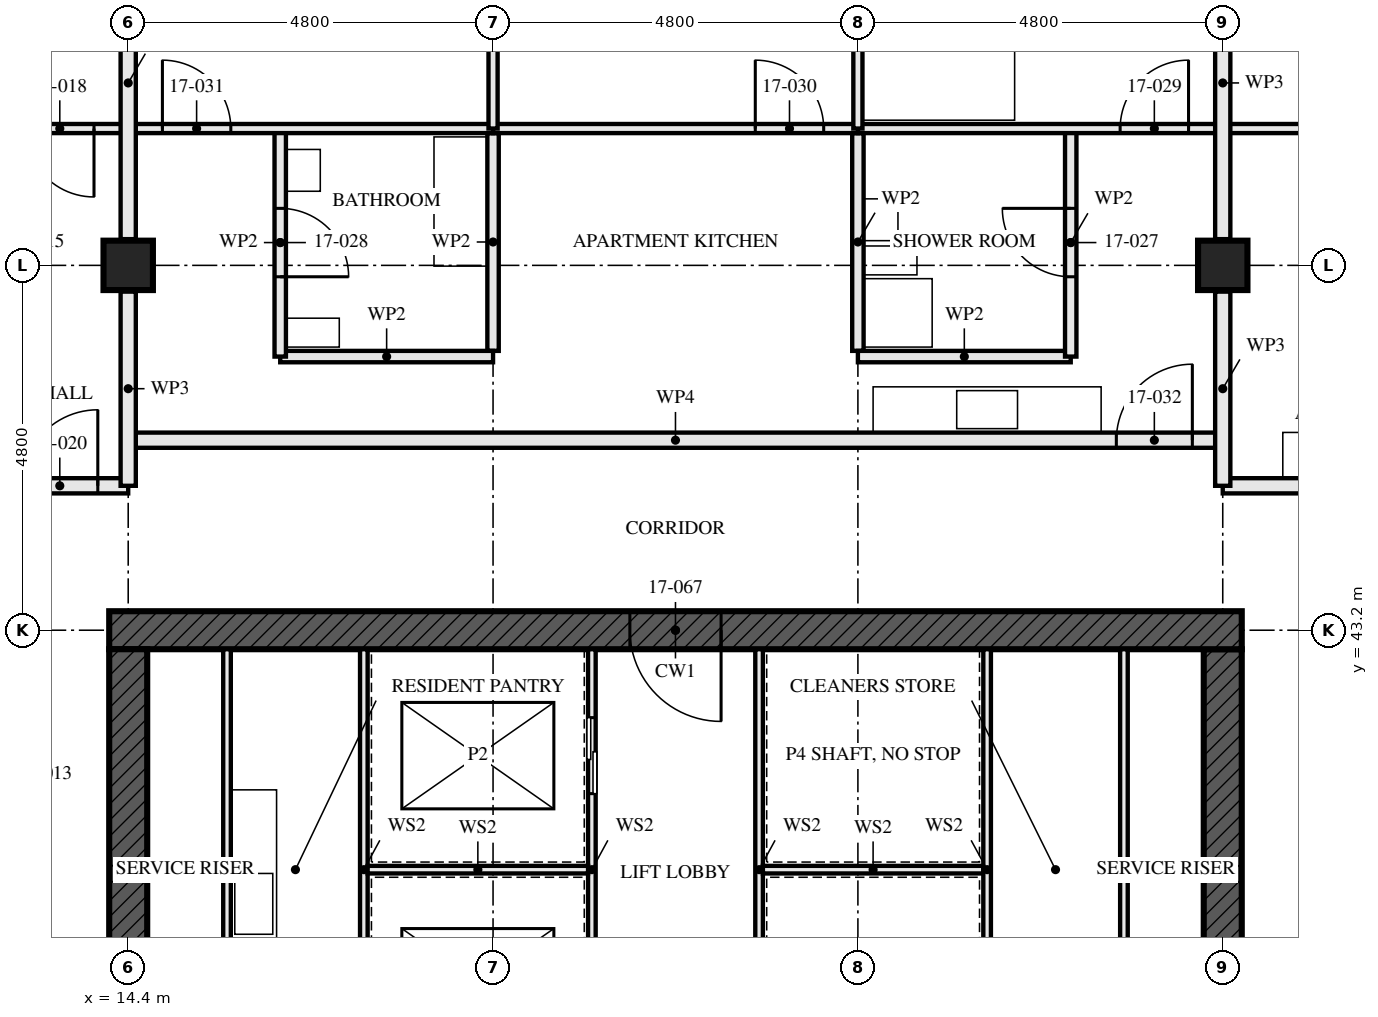
"""IFC4 building model, lengths in metres.
Left out: names, types, materials, properties, quantities, classifications, styles, units other than length and angle.
Written with IfcOpenShell. Run it as: python <this file> out.ifc"""

import sys

from ifc_helpers import new_model, si_unit, direction, frame, frame_2d, origin, origin_2d, place, context, subcontext, project, spatial, rectangle, hollow_rectangle, extrude, element, fill, save


model = new_model("IFC4")
c1 = context("Model", 3, precision=1e-05, world=origin(), true_north=direction((0.0, 1.0)))
c2 = subcontext(c1, "Body", "Model", "MODEL_VIEW")
j1 = project(units=[si_unit("LENGTHUNIT", "METRE"), si_unit("PLANEANGLEUNIT", "RADIAN")], contexts=[c1])
p1 = place(None, origin())
s1 = spatial("IfcSite", under=j1, at=p1, CompositionType="ELEMENT")
p2 = place(p1, origin())
s2 = spatial("IfcBuilding", under=s1, at=p2, CompositionType="ELEMENT")
p3 = place(p2, frame((0.0, 0.0, 65.5)))
s3 = spatial("IfcBuildingStorey", under=s2, at=p3, CompositionType="ELEMENT", Elevation=65.5)
for number, where, z_axis, x_axis in (
    (1, (14.4, 48.0, 0.0), (0.0, 0.0, 1.0), (1.0, 0.0, 0.0)),
    (2, (28.8, 48.0, 0.0), (0.0, 0.0, 1.0), (1.0, 0.0, 0.0)),
):
    element("IfcColumn", number, at=place(p3, frame(where, z_axis=z_axis, x_axis=x_axis)), inside=s3, PredefinedType="COLUMN", context=c2, shape_type="SweptSolid", body=[
        extrude(hollow_rectangle(XDim=0.65, YDim=0.65, WallThickness=0.05, at=origin_2d()), origin(), (0.0, 0.0, 1.0), 3.5),
    ])
p4 = place(p3, frame((29.05, 43.2, -0.17), z_axis=(0.0, 0.0, 1.0), x_axis=(-1.0, 0.0, 0.0)))
e3 = element("IfcWall", 3, at=p4, inside=s3, PredefinedType="SHEAR", context=c2, shape_type="SweptSolid", body=[
    extrude(rectangle(XDim=14.9, YDim=0.5, at=frame_2d((7.45, 0.0))), origin(), (0.0, 0.0, 1.0), 3.5),
])
p5 = place(p4, frame((6.85, 0.0, 0.17)))
e4 = element("IfcOpeningElement", 4, at=p5, cuts=e3, PredefinedType="OPENING", context=c2, shape_type="SweptSolid", body=[
    extrude(rectangle(XDim=1.2, YDim=2.1, at=frame_2d((0.6, 1.05))), frame((0.0, 0.26, 0.0), z_axis=(0.0, -1.0, 0.0), x_axis=(1.0, 0.0, 0.0)), (0.0, 0.0, 1.0), 0.521),
])
p6 = place(p3, frame((14.4, 42.95, -0.17), z_axis=(0.0, 0.0, 1.0), x_axis=(0.0, -1.0, 0.0)))
e5 = element("IfcWall", 5, at=p6, inside=s3, PredefinedType="SHEAR", context=c2, shape_type="SweptSolid", body=[
    extrude(rectangle(XDim=13.9, YDim=0.5, at=frame_2d((6.95, 0.0))), origin(), (0.0, 0.0, 1.0), 3.5),
])
p7 = place(p6, frame((6.35, 0.0, 0.17)))
e6 = element("IfcOpeningElement", 6, at=p7, cuts=e5, PredefinedType="OPENING", context=c2, shape_type="SweptSolid", body=[
    extrude(rectangle(XDim=1.2, YDim=2.1, at=frame_2d((0.6, 1.05))), frame((0.0, 0.26, 0.0), z_axis=(0.0, -1.0, 0.0), x_axis=(1.0, 0.0, 0.0)), (0.0, 0.0, 1.0), 0.521),
])
p8 = place(p3, frame((28.8, 29.05, -0.17), z_axis=(0.0, 0.0, 1.0), x_axis=(0.0, 1.0, 0.0)))
e7 = element("IfcWall", 7, at=p8, inside=s3, PredefinedType="SHEAR", context=c2, shape_type="SweptSolid", body=[
    extrude(rectangle(XDim=13.9, YDim=0.5, at=frame_2d((6.95, 0.0))), origin(), (0.0, 0.0, 1.0), 3.5),
])
p9 = place(p8, frame((6.35, 0.0, 0.17)))
e8 = element("IfcOpeningElement", 8, at=p9, cuts=e7, PredefinedType="OPENING", context=c2, shape_type="SweptSolid", body=[
    extrude(rectangle(XDim=1.2, YDim=2.1, at=frame_2d((0.6, 1.05))), frame((0.0, 0.26, 0.0), z_axis=(0.0, -1.0, 0.0), x_axis=(1.0, 0.0, 0.0)), (0.0, 0.0, 1.0), 0.521),
])
p10 = place(p3, frame((14.4, 49.8, 0.0), z_axis=(0.0, 0.0, 1.0), x_axis=(-1.0, 0.0, 0.0)))
e9 = element("IfcWall", 9, at=p10, inside=s3, PredefinedType="PARTITIONING", context=c2, shape_type="SweptSolid", body=[
    extrude(rectangle(XDim=4.8, YDim=0.12, at=frame_2d((2.4, 0.0))), origin(), (0.0, 0.0, 1.0), 3.33),
])
p11 = place(p10, frame((0.45, 0.0, 0.0)))
e10 = element("IfcOpeningElement", 10, at=p11, cuts=e9, PredefinedType="OPENING", context=c2, shape_type="SweptSolid", body=[
    extrude(rectangle(XDim=0.9, YDim=2.1, at=frame_2d((0.45, 1.05))), frame((0.0, 0.071, 0.0), z_axis=(0.0, -1.0, 0.0), x_axis=(1.0, 0.0, 0.0)), (0.0, 0.0, 1.0), 0.141),
])
p12 = place(p3, frame((14.4, 45.1, 0.0), z_axis=(0.0, 0.0, 1.0), x_axis=(-1.0, 0.0, 0.0)))
e11 = element("IfcWall", 11, at=p12, inside=s3, PredefinedType="PARTITIONING", context=c2, shape_type="SweptSolid", body=[
    extrude(rectangle(XDim=9.6, YDim=0.2, at=frame_2d((4.8, 0.0))), origin(), (0.0, 0.0, 1.0), 3.33),
])
p13 = place(p12, frame((0.4, 0.0, 0.0)))
e12 = element("IfcOpeningElement", 12, at=p13, cuts=e11, PredefinedType="OPENING", context=c2, shape_type="SweptSolid", body=[
    extrude(rectangle(XDim=1.0, YDim=2.1, at=frame_2d((0.5, 1.05))), frame((0.0, 0.111, 0.0), z_axis=(0.0, -1.0, 0.0), x_axis=(1.0, 0.0, 0.0)), (0.0, 0.0, 1.0), 0.221),
])
p14 = place(p3, frame((26.8, 49.8, 0.0), z_axis=(0.0, 0.0, 1.0), x_axis=(0.0, -1.0, 0.0)))
e13 = element("IfcWall", 13, at=p14, inside=s3, PredefinedType="PARTITIONING", context=c2, shape_type="SweptSolid", body=[
    extrude(rectangle(XDim=3.0, YDim=0.15, at=frame_2d((1.5, 0.0))), origin(), (0.0, 0.0, 1.0), 2.55),
])
p15 = place(p14, frame((1.05, 0.0, 0.0)))
e14 = element("IfcOpeningElement", 14, at=p15, cuts=e13, PredefinedType="OPENING", context=c2, shape_type="SweptSolid", body=[
    extrude(rectangle(XDim=0.9, YDim=2.1, at=frame_2d((0.45, 1.05))), frame((0.0, 0.085, 0.0), z_axis=(0.0, -1.0, 0.0), x_axis=(1.0, 0.0, 0.0)), (0.0, 0.0, 1.0), 0.171),
])
p16 = place(p3, frame((26.8, 46.8, 0.0), z_axis=(0.0, 0.0, 1.0), x_axis=(-1.0, 0.0, 0.0)))
e15 = element("IfcWall", 15, at=p16, inside=s3, PredefinedType="PARTITIONING", context=c2, shape_type="SweptSolid", body=[
    extrude(rectangle(XDim=2.8, YDim=0.15, at=frame_2d((1.4, 0.0))), origin(), (0.0, 0.0, 1.0), 3.33),
])
p17 = place(p3, frame((16.4, 49.8, 0.0), z_axis=(0.0, 0.0, 1.0), x_axis=(0.0, -1.0, 0.0)))
e16 = element("IfcWall", 16, at=p17, inside=s3, PredefinedType="PARTITIONING", context=c2, shape_type="SweptSolid", body=[
    extrude(rectangle(XDim=3.0, YDim=0.15, at=frame_2d((1.5, 0.0))), origin(), (0.0, 0.0, 1.0), 2.55),
])
p18 = place(p17, frame((1.05, 0.0, 0.0)))
e17 = element("IfcOpeningElement", 17, at=p18, cuts=e16, PredefinedType="OPENING", context=c2, shape_type="SweptSolid", body=[
    extrude(rectangle(XDim=0.9, YDim=2.1, at=frame_2d((0.45, 1.05))), frame((0.0, 0.085, 0.0), z_axis=(0.0, -1.0, 0.0), x_axis=(1.0, 0.0, 0.0)), (0.0, 0.0, 1.0), 0.171),
])
p19 = place(p3, frame((19.2, 46.8, 0.0), z_axis=(0.0, 0.0, 1.0), x_axis=(-1.0, 0.0, 0.0)))
e18 = element("IfcWall", 18, at=p19, inside=s3, PredefinedType="PARTITIONING", context=c2, shape_type="SweptSolid", body=[
    extrude(rectangle(XDim=2.8, YDim=0.15, at=frame_2d((1.4, 0.0))), origin(), (0.0, 0.0, 1.0), 3.33),
])
p20 = place(p3, frame((28.8, 49.8, 0.0), z_axis=(0.0, 0.0, 1.0), x_axis=(-1.0, 0.0, 0.0)))
e19 = element("IfcWall", 19, at=p20, inside=s3, PredefinedType="PARTITIONING", context=c2, shape_type="SweptSolid", body=[
    extrude(rectangle(XDim=4.8, YDim=0.12, at=frame_2d((2.4, 0.0))), origin(), (0.0, 0.0, 1.0), 3.33),
])
p21 = place(p20, frame((0.45, 0.0, 0.0)))
e20 = element("IfcOpeningElement", 20, at=p21, cuts=e19, PredefinedType="OPENING", context=c2, shape_type="SweptSolid", body=[
    extrude(rectangle(XDim=0.9, YDim=2.1, at=frame_2d((0.45, 1.05))), frame((0.0, 0.071, 0.0), z_axis=(0.0, -1.0, 0.0), x_axis=(1.0, 0.0, 0.0)), (0.0, 0.0, 1.0), 0.141),
])
p22 = place(p3, frame((24.0, 49.8, 0.0), z_axis=(0.0, 0.0, 1.0), x_axis=(-1.0, 0.0, 0.0)))
e21 = element("IfcWall", 21, at=p22, inside=s3, PredefinedType="PARTITIONING", context=c2, shape_type="SweptSolid", body=[
    extrude(rectangle(XDim=4.8, YDim=0.12, at=frame_2d((2.4, 0.0))), origin(), (0.0, 0.0, 1.0), 3.33),
])
p23 = place(p22, frame((0.45, 0.0, 0.0)))
e22 = element("IfcOpeningElement", 22, at=p23, cuts=e21, PredefinedType="OPENING", context=c2, shape_type="SweptSolid", body=[
    extrude(rectangle(XDim=0.9, YDim=2.1, at=frame_2d((0.45, 1.05))), frame((0.0, 0.071, 0.0), z_axis=(0.0, -1.0, 0.0), x_axis=(1.0, 0.0, 0.0)), (0.0, 0.0, 1.0), 0.141),
])
p24 = place(p3, frame((19.2, 49.8, 0.0), z_axis=(0.0, 0.0, 1.0), x_axis=(-1.0, 0.0, 0.0)))
e23 = element("IfcWall", 23, at=p24, inside=s3, PredefinedType="PARTITIONING", context=c2, shape_type="SweptSolid", body=[
    extrude(rectangle(XDim=4.8, YDim=0.12, at=frame_2d((2.4, 0.0))), origin(), (0.0, 0.0, 1.0), 3.33),
])
p25 = place(p24, frame((3.45, 0.0, 0.0)))
e24 = element("IfcOpeningElement", 24, at=p25, cuts=e23, PredefinedType="OPENING", context=c2, shape_type="SweptSolid", body=[
    extrude(rectangle(XDim=0.9, YDim=2.1, at=frame_2d((0.45, 1.05))), frame((0.0, 0.071, 0.0), z_axis=(0.0, -1.0, 0.0), x_axis=(1.0, 0.0, 0.0)), (0.0, 0.0, 1.0), 0.141),
])
for number, where, z_axis, x_axis in (
    (25, (24.0, 57.28, 0.0), (0.0, 0.0, 1.0), (0.0, -1.0, 0.0)),
    (26, (19.2, 57.28, 0.0), (0.0, 0.0, 1.0), (0.0, -1.0, 0.0)),
):
    element("IfcWall", number, at=place(p3, frame(where, z_axis=z_axis, x_axis=x_axis)), inside=s3, PredefinedType="PARTITIONING", context=c2, shape_type="SweptSolid", body=[
        extrude(rectangle(XDim=7.48, YDim=0.12, at=frame_2d((3.74, 0.0))), origin(), (0.0, 0.0, 1.0), 2.55),
    ])
p26 = place(p3, frame((28.8, 45.7, 0.0), z_axis=(0.0, 0.0, 1.0), x_axis=(-1.0, 0.0, 0.0)))
e27 = element("IfcWall", 27, at=p26, inside=s3, PredefinedType="PARTITIONING", context=c2, shape_type="SweptSolid", body=[
    extrude(rectangle(XDim=14.4, YDim=0.2, at=frame_2d((7.2, 0.0))), origin(), (0.0, 0.0, 1.0), 3.33),
])
p27 = place(p26, frame((0.4, 0.0, 0.0)))
e28 = element("IfcOpeningElement", 28, at=p27, cuts=e27, PredefinedType="OPENING", context=c2, shape_type="SweptSolid", body=[
    extrude(rectangle(XDim=1.0, YDim=2.1, at=frame_2d((0.5, 1.05))), frame((0.0, 0.111, 0.0), z_axis=(0.0, -1.0, 0.0), x_axis=(1.0, 0.0, 0.0)), (0.0, 0.0, 1.0), 0.221),
])
p28 = place(p3, frame((33.6, 49.8, 0.0), z_axis=(0.0, 0.0, 1.0), x_axis=(-1.0, 0.0, 0.0)))
e29 = element("IfcWall", 29, at=p28, inside=s3, PredefinedType="PARTITIONING", context=c2, shape_type="SweptSolid", body=[
    extrude(rectangle(XDim=4.8, YDim=0.12, at=frame_2d((2.4, 0.0))), origin(), (0.0, 0.0, 1.0), 3.33),
])
p29 = place(p3, frame((38.4, 45.1, 0.0), z_axis=(0.0, 0.0, 1.0), x_axis=(-1.0, 0.0, 0.0)))
e30 = element("IfcWall", 30, at=p29, inside=s3, PredefinedType="PARTITIONING", context=c2, shape_type="SweptSolid", body=[
    extrude(rectangle(XDim=9.6, YDim=0.2, at=frame_2d((4.8, 0.0))), origin(), (0.0, 0.0, 1.0), 3.33),
])
p30 = place(p29, frame((0.4, 0.0, 0.0)))
e31 = element("IfcOpeningElement", 31, at=p30, cuts=e30, PredefinedType="OPENING", context=c2, shape_type="SweptSolid", body=[
    extrude(rectangle(XDim=1.0, YDim=2.1, at=frame_2d((0.5, 1.05))), frame((0.0, 0.111, 0.0), z_axis=(0.0, -1.0, 0.0), x_axis=(1.0, 0.0, 0.0)), (0.0, 0.0, 1.0), 0.221),
])
for number, where, z_axis, x_axis in (
    (32, (15.7, 37.15, 0.0), (0.0, 0.0, 1.0), (0.0, 1.0, 0.0)),
    (33, (27.5, 37.15, 0.0), (0.0, 0.0, 1.0), (0.0, 1.0, 0.0)),
):
    element("IfcWall", number, at=place(p3, frame(where, z_axis=z_axis, x_axis=x_axis)), inside=s3, PredefinedType="SOLIDWALL", context=c2, shape_type="SweptSolid", body=[
        extrude(rectangle(XDim=5.8, YDim=0.1, at=frame_2d((2.9, 0.0))), origin(), (0.0, 0.0, 1.0), 3.33),
    ])
p31 = place(p3, frame((20.5, 37.15, 0.0), z_axis=(0.0, 0.0, 1.0), x_axis=(0.0, 1.0, 0.0)))
e34 = element("IfcWall", 34, at=p31, inside=s3, PredefinedType="SOLIDWALL", context=c2, shape_type="SweptSolid", body=[
    extrude(rectangle(XDim=5.8, YDim=0.1, at=frame_2d((2.9, 0.0))), origin(), (0.0, 0.0, 1.0), 3.33),
])
p32 = place(p31, frame((0.925, 0.0, 0.0)))
e35 = element("IfcOpeningElement", 35, at=p32, cuts=e34, PredefinedType="OPENING", context=c2, shape_type="SweptSolid", body=[
    extrude(rectangle(XDim=1.0, YDim=2.1, at=frame_2d((0.5, 1.05))), frame((0.0, 0.061, 0.0), z_axis=(0.0, -1.0, 0.0), x_axis=(1.0, 0.0, 0.0)), (0.0, 0.0, 1.0), 0.121),
])
p33 = place(p31, frame((3.9, 0.0, 0.0)))
e36 = element("IfcOpeningElement", 36, at=p33, cuts=e34, PredefinedType="OPENING", context=c2, shape_type="SweptSolid", body=[
    extrude(rectangle(XDim=1.0, YDim=2.1, at=frame_2d((0.5, 1.05))), frame((0.0, 0.061, 0.0), z_axis=(0.0, -1.0, 0.0), x_axis=(1.0, 0.0, 0.0)), (0.0, 0.0, 1.0), 0.121),
])
for number, where, z_axis, x_axis in (
    (37, (22.7, 37.15, 0.0), (0.0, 0.0, 1.0), (0.0, 1.0, 0.0)),
    (38, (17.5, 37.15, 0.0), (0.0, 0.0, 1.0), (0.0, 1.0, 0.0)),
):
    element("IfcWall", number, at=place(p3, frame(where, z_axis=z_axis, x_axis=x_axis)), inside=s3, PredefinedType="SOLIDWALL", context=c2, shape_type="SweptSolid", body=[
        extrude(rectangle(XDim=5.8, YDim=0.1, at=frame_2d((2.9, 0.0))), origin(), (0.0, 0.0, 1.0), 3.33),
    ])
for number, where, z_axis, x_axis in (
    (39, (17.55, 40.05, 0.0), (0.0, 0.0, 1.0), (1.0, 0.0, 0.0)),
    (40, (22.75, 40.05, 0.0), (0.0, 0.0, 1.0), (1.0, 0.0, 0.0)),
):
    element("IfcWall", number, at=place(p3, frame(where, z_axis=z_axis, x_axis=x_axis)), inside=s3, PredefinedType="SOLIDWALL", context=c2, shape_type="SweptSolid", body=[
        extrude(rectangle(XDim=2.9, YDim=0.1, at=frame_2d((1.45, 0.0))), origin(), (0.0, 0.0, 1.0), 3.33),
    ])
p34 = place(p3, frame((25.7, 37.15, 0.0), z_axis=(0.0, 0.0, 1.0), x_axis=(0.0, 1.0, 0.0)))
e41 = element("IfcWall", 41, at=p34, inside=s3, PredefinedType="SOLIDWALL", context=c2, shape_type="SweptSolid", body=[
    extrude(rectangle(XDim=5.8, YDim=0.1, at=frame_2d((2.9, 0.0))), origin(), (0.0, 0.0, 1.0), 3.33),
])
p35 = place(p3, frame((14.4, 45.1, 0.0), z_axis=(0.0, 0.0, 1.0), x_axis=(0.0, 1.0, 0.0)))
e42 = element("IfcWall", 42, at=p35, inside=s3, PredefinedType="PARTITIONING", context=c2, shape_type="SweptSolid", body=[
    extrude(rectangle(XDim=2.555, YDim=0.2, at=frame_2d((1.277, 0.0))), origin(), (0.0, 0.0, 1.0), 2.32),
])
p36 = place(p3, frame((14.4, 48.345, 0.0), z_axis=(0.0, 0.0, 1.0), x_axis=(0.0, 1.0, 0.0)))
e43 = element("IfcWall", 43, at=p36, inside=s3, PredefinedType="PARTITIONING", context=c2, shape_type="SweptSolid", body=[
    extrude(rectangle(XDim=4.11, YDim=0.2, at=frame_2d((2.055, 0.0))), origin(), (0.0, 0.0, 1.0), 2.32),
])
p37 = place(p3, frame((28.8, 45.1, 0.0), z_axis=(0.0, 0.0, 1.0), x_axis=(0.0, 1.0, 0.0)))
e44 = element("IfcWall", 44, at=p37, inside=s3, PredefinedType="PARTITIONING", context=c2, shape_type="SweptSolid", body=[
    extrude(rectangle(XDim=2.555, YDim=0.2, at=frame_2d((1.277, 0.0))), origin(), (0.0, 0.0, 1.0), 2.32),
])
p38 = place(p3, frame((28.8, 48.345, 0.0), z_axis=(0.0, 0.0, 1.0), x_axis=(0.0, 1.0, 0.0)))
e45 = element("IfcWall", 45, at=p38, inside=s3, PredefinedType="PARTITIONING", context=c2, shape_type="SweptSolid", body=[
    extrude(rectangle(XDim=4.11, YDim=0.2, at=frame_2d((2.055, 0.0))), origin(), (0.0, 0.0, 1.0), 2.32),
])
for number, where, z_axis, x_axis in (
    (46, (24.0, 46.875, 0.0), (0.0, 0.0, 1.0), (0.0, 1.0, 0.0)),
    (47, (19.2, 49.74, 0.0), (0.0, 0.0, 1.0), (0.0, -1.0, 0.0)),
):
    element("IfcWall", number, at=place(p3, frame(where, z_axis=z_axis, x_axis=x_axis)), inside=s3, PredefinedType="PARTITIONING", context=c2, shape_type="SweptSolid", body=[
        extrude(rectangle(XDim=2.865, YDim=0.15, at=frame_2d((1.433, 0.0))), origin(), (0.0, 0.0, 1.0), 2.55),
    ])
p39 = place(p11, origin())
e48 = element("IfcDoor", 48, at=p39, inside=s3, OperationType="SINGLE_SWING_RIGHT", PredefinedType="DOOR", context=c2, shape_type="SweptSolid", body=[
    extrude(rectangle(XDim=0.9, YDim=2.1, at=frame_2d((0.45, 1.05))), frame((0.0, 0.022, 0.0), z_axis=(0.0, -1.0, 0.0), x_axis=(1.0, 0.0, 0.0)), (0.0, 0.0, 1.0), 0.044),
])
fill(e10, e48)
p40 = place(p13, frame((1.0, 0.0, 0.0), z_axis=(0.0, 0.0, 1.0), x_axis=(-1.0, 0.0, 0.0)))
e49 = element("IfcDoor", 49, at=p40, inside=s3, OperationType="SINGLE_SWING_LEFT", PredefinedType="DOOR", context=c2, shape_type="SweptSolid", body=[
    extrude(rectangle(XDim=1.0, YDim=2.1, at=frame_2d((0.5, 1.05))), frame((0.0, 0.027, 0.0), z_axis=(0.0, -1.0, 0.0), x_axis=(1.0, 0.0, 0.0)), (0.0, 0.0, 1.0), 0.054),
])
fill(e12, e49)
p41 = place(p15, frame((0.9, 0.0, 0.0), z_axis=(0.0, 0.0, 1.0), x_axis=(-1.0, 0.0, 0.0)))
e50 = element("IfcDoor", 50, at=p41, inside=s3, OperationType="SINGLE_SWING_LEFT", PredefinedType="DOOR", context=c2, shape_type="SweptSolid", body=[
    extrude(rectangle(XDim=0.9, YDim=2.1, at=frame_2d((0.45, 1.05))), frame((0.0, 0.022, 0.0), z_axis=(0.0, -1.0, 0.0), x_axis=(1.0, 0.0, 0.0)), (0.0, 0.0, 1.0), 0.044),
])
fill(e14, e50)
p42 = place(p18, origin())
e51 = element("IfcDoor", 51, at=p42, inside=s3, OperationType="SINGLE_SWING_LEFT", PredefinedType="DOOR", context=c2, shape_type="SweptSolid", body=[
    extrude(rectangle(XDim=0.9, YDim=2.1, at=frame_2d((0.45, 1.05))), frame((0.0, 0.022, 0.0), z_axis=(0.0, -1.0, 0.0), x_axis=(1.0, 0.0, 0.0)), (0.0, 0.0, 1.0), 0.044),
])
fill(e17, e51)
p43 = place(p21, frame((0.9, 0.0, 0.0), z_axis=(0.0, 0.0, 1.0), x_axis=(-1.0, 0.0, 0.0)))
e52 = element("IfcDoor", 52, at=p43, inside=s3, OperationType="SINGLE_SWING_LEFT", PredefinedType="DOOR", context=c2, shape_type="SweptSolid", body=[
    extrude(rectangle(XDim=0.9, YDim=2.1, at=frame_2d((0.45, 1.05))), frame((0.0, 0.022, 0.0), z_axis=(0.0, -1.0, 0.0), x_axis=(1.0, 0.0, 0.0)), (0.0, 0.0, 1.0), 0.044),
])
fill(e20, e52)
p44 = place(p23, frame((0.9, 0.0, 0.0), z_axis=(0.0, 0.0, 1.0), x_axis=(-1.0, 0.0, 0.0)))
e53 = element("IfcDoor", 53, at=p44, inside=s3, OperationType="SINGLE_SWING_RIGHT", PredefinedType="DOOR", context=c2, shape_type="SweptSolid", body=[
    extrude(rectangle(XDim=0.9, YDim=2.1, at=frame_2d((0.45, 1.05))), frame((0.0, 0.022, 0.0), z_axis=(0.0, -1.0, 0.0), x_axis=(1.0, 0.0, 0.0)), (0.0, 0.0, 1.0), 0.044),
])
fill(e22, e53)
p45 = place(p25, frame((0.9, 0.0, 0.0), z_axis=(0.0, 0.0, 1.0), x_axis=(-1.0, 0.0, 0.0)))
e54 = element("IfcDoor", 54, at=p45, inside=s3, OperationType="SINGLE_SWING_RIGHT", PredefinedType="DOOR", context=c2, shape_type="SweptSolid", body=[
    extrude(rectangle(XDim=0.9, YDim=2.1, at=frame_2d((0.45, 1.05))), frame((0.0, 0.022, 0.0), z_axis=(0.0, -1.0, 0.0), x_axis=(1.0, 0.0, 0.0)), (0.0, 0.0, 1.0), 0.044),
])
fill(e24, e54)
p46 = place(p27, frame((1.0, 0.0, 0.0), z_axis=(0.0, 0.0, 1.0), x_axis=(-1.0, 0.0, 0.0)))
e55 = element("IfcDoor", 55, at=p46, inside=s3, OperationType="SINGLE_SWING_LEFT", PredefinedType="DOOR", context=c2, shape_type="SweptSolid", body=[
    extrude(rectangle(XDim=1.0, YDim=2.1, at=frame_2d((0.5, 1.05))), frame((0.0, 0.027, 0.0), z_axis=(0.0, -1.0, 0.0), x_axis=(1.0, 0.0, 0.0)), (0.0, 0.0, 1.0), 0.054),
])
fill(e28, e55)
p47 = place(p33, origin())
e56 = element("IfcDoor", 56, at=p47, inside=s3, OperationType="SLIDING_TO_LEFT", PredefinedType="DOOR", context=c2, shape_type="SweptSolid", body=[
    extrude(rectangle(XDim=1.0, YDim=2.1, at=frame_2d((0.5, 1.05))), frame((0.0, 0.05, 0.0), z_axis=(0.0, -1.0, 0.0), x_axis=(1.0, 0.0, 0.0)), (0.0, 0.0, 1.0), 0.1),
])
fill(e36, e56)
p48 = place(p5, origin())
e57 = element("IfcDoor", 57, at=p48, inside=s3, OperationType="SINGLE_SWING_LEFT", PredefinedType="DOOR", context=c2, shape_type="SweptSolid", body=[
    extrude(rectangle(XDim=1.2, YDim=2.1, at=frame_2d((0.6, 1.05))), frame((0.0, 0.027, 0.0), z_axis=(0.0, -1.0, 0.0), x_axis=(1.0, 0.0, 0.0)), (0.0, 0.0, 1.0), 0.054),
])
fill(e4, e57)
save(model, sys.argv[1])
